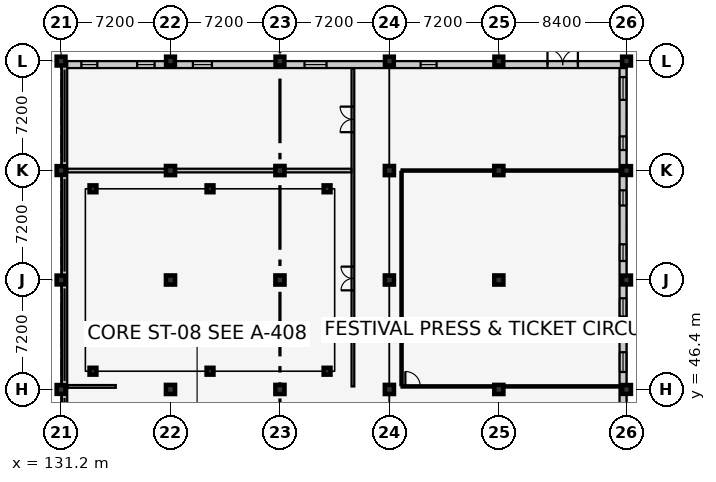
"""IFC4 building model, lengths in metres.
Left out: names, types, materials, properties, quantities, classifications, styles, units other than length and angle.
Written with IfcOpenShell. Run it as: python <this file> out.ifc"""

import sys

from ifc_helpers import new_model, si_unit, direction, frame, frame_2d, origin, origin_2d, place, context, subcontext, project, spatial, rectangle, extrude, element, fill, save


model = new_model("IFC4")
c1 = context("Model", 3, precision=1e-05, world=origin(), true_north=direction((0.0, 1.0)))
c2 = subcontext(c1, "Body", "Model", "MODEL_VIEW")
j1 = project(units=[si_unit("LENGTHUNIT", "METRE"), si_unit("PLANEANGLEUNIT", "RADIAN")], contexts=[c1])
p1 = place(None, origin())
s1 = spatial("IfcSite", under=j1, at=p1, CompositionType="ELEMENT")
p2 = place(p1, origin())
s2 = spatial("IfcBuilding", under=s1, at=p2, CompositionType="ELEMENT")
p3 = place(p2, origin())
s3 = spatial("IfcBuildingStorey", under=s2, at=p3, CompositionType="ELEMENT", Elevation=0.0)
for number, where, z_axis, x_axis in (
    (1, (131.2, 46.4, 0.0), (0.0, 0.0, 1.0), (1.0, 0.0, 0.0)),
    (2, (131.2, 53.6, 0.0), (0.0, 0.0, 1.0), (1.0, 0.0, 0.0)),
    (3, (131.2, 60.8, 0.0), (0.0, 0.0, 1.0), (1.0, 0.0, 0.0)),
    (4, (131.2, 68.0, 0.0), (0.0, 0.0, 1.0), (1.0, 0.0, 0.0)),
):
    element("IfcColumn", number, at=place(p3, frame(where, z_axis=z_axis, x_axis=x_axis)), inside=s3, PredefinedType="COLUMN", context=c2, shape_type="SweptSolid", body=[
        extrude(rectangle(XDim=0.58, YDim=0.58, at=origin_2d()), origin(), (0.0, 0.0, 1.0), 5.4),
    ])
for number, where, z_axis, x_axis in (
    (5, (138.4, 46.4, 0.0), (0.0, 0.0, 1.0), (1.0, 0.0, 0.0)),
    (6, (138.4, 53.6, 0.0), (0.0, 0.0, 1.0), (1.0, 0.0, 0.0)),
    (7, (138.4, 60.8, 0.0), (0.0, 0.0, 1.0), (1.0, 0.0, 0.0)),
):
    element("IfcColumn", number, at=place(p3, frame(where, z_axis=z_axis, x_axis=x_axis)), inside=s3, PredefinedType="COLUMN", context=c2, shape_type="SweptSolid", body=[
        extrude(rectangle(XDim=0.6, YDim=0.6, at=origin_2d()), origin(), (0.0, 0.0, 1.0), 5.4),
    ])
p4 = place(p3, frame((138.4, 68.0, 0.0), z_axis=(0.0, 0.0, 1.0), x_axis=(1.0, 0.0, 0.0)))
e8 = element("IfcColumn", 8, at=p4, inside=s3, PredefinedType="COLUMN", context=c2, shape_type="SweptSolid", body=[
    extrude(rectangle(XDim=0.58, YDim=0.58, at=origin_2d()), origin(), (0.0, 0.0, 1.0), 5.4),
])
for number, where, z_axis, x_axis in (
    (9, (145.6, 46.4, 0.0), (0.0, 0.0, 1.0), (1.0, 0.0, 0.0)),
    (10, (145.6, 53.6, 0.0), (0.0, 0.0, 1.0), (1.0, 0.0, 0.0)),
    (11, (145.6, 60.8, 0.0), (0.0, 0.0, 1.0), (1.0, 0.0, 0.0)),
):
    element("IfcColumn", number, at=place(p3, frame(where, z_axis=z_axis, x_axis=x_axis)), inside=s3, PredefinedType="COLUMN", context=c2, shape_type="SweptSolid", body=[
        extrude(rectangle(XDim=0.6, YDim=0.6, at=origin_2d()), origin(), (0.0, 0.0, 1.0), 5.4),
    ])
p5 = place(p3, frame((145.6, 68.0, 0.0), z_axis=(0.0, 0.0, 1.0), x_axis=(1.0, 0.0, 0.0)))
e12 = element("IfcColumn", 12, at=p5, inside=s3, PredefinedType="COLUMN", context=c2, shape_type="SweptSolid", body=[
    extrude(rectangle(XDim=0.58, YDim=0.58, at=origin_2d()), origin(), (0.0, 0.0, 1.0), 5.4),
])
for number, where, z_axis, x_axis in (
    (13, (152.8, 46.4, 0.0), (0.0, 0.0, 1.0), (1.0, 0.0, 0.0)),
    (14, (152.8, 53.6, 0.0), (0.0, 0.0, 1.0), (1.0, 0.0, 0.0)),
    (15, (152.8, 60.8, 0.0), (0.0, 0.0, 1.0), (1.0, 0.0, 0.0)),
):
    element("IfcColumn", number, at=place(p3, frame(where, z_axis=z_axis, x_axis=x_axis)), inside=s3, PredefinedType="COLUMN", context=c2, shape_type="SweptSolid", body=[
        extrude(rectangle(XDim=0.6, YDim=0.6, at=origin_2d()), origin(), (0.0, 0.0, 1.0), 5.4),
    ])
p6 = place(p3, frame((152.8, 68.0, 0.0), z_axis=(0.0, 0.0, 1.0), x_axis=(1.0, 0.0, 0.0)))
e16 = element("IfcColumn", 16, at=p6, inside=s3, PredefinedType="COLUMN", context=c2, shape_type="SweptSolid", body=[
    extrude(rectangle(XDim=0.58, YDim=0.58, at=origin_2d()), origin(), (0.0, 0.0, 1.0), 5.4),
])
for number, where, z_axis, x_axis in (
    (17, (160.0, 46.4, 0.0), (0.0, 0.0, 1.0), (1.0, 0.0, 0.0)),
    (18, (160.0, 53.6, 0.0), (0.0, 0.0, 1.0), (1.0, 0.0, 0.0)),
    (19, (160.0, 60.8, 0.0), (0.0, 0.0, 1.0), (1.0, 0.0, 0.0)),
):
    element("IfcColumn", number, at=place(p3, frame(where, z_axis=z_axis, x_axis=x_axis)), inside=s3, PredefinedType="COLUMN", context=c2, shape_type="SweptSolid", body=[
        extrude(rectangle(XDim=0.6, YDim=0.6, at=origin_2d()), origin(), (0.0, 0.0, 1.0), 5.4),
    ])
for number, where, z_axis, x_axis in (
    (20, (160.0, 68.0, 0.0), (0.0, 0.0, 1.0), (1.0, 0.0, 0.0)),
    (21, (168.4, 46.4, 0.0), (0.0, 0.0, 1.0), (1.0, 0.0, 0.0)),
    (22, (168.4, 53.6, 0.0), (0.0, 0.0, 1.0), (1.0, 0.0, 0.0)),
    (23, (168.4, 60.8, 0.0), (0.0, 0.0, 1.0), (1.0, 0.0, 0.0)),
    (24, (168.4, 68.0, 0.0), (0.0, 0.0, 1.0), (1.0, 0.0, 0.0)),
):
    element("IfcColumn", number, at=place(p3, frame(where, z_axis=z_axis, x_axis=x_axis)), inside=s3, PredefinedType="COLUMN", context=c2, shape_type="SweptSolid", body=[
        extrude(rectangle(XDim=0.58, YDim=0.58, at=origin_2d()), origin(), (0.0, 0.0, 1.0), 5.4),
    ])
p7 = place(p3, frame((133.3, 47.6, -0.55), z_axis=(0.0, 0.0, 1.0), x_axis=(1.0, 0.0, 0.0)))
e25 = element("IfcColumn", 25, at=p7, inside=s3, PredefinedType="COLUMN", context=c2, shape_type="SweptSolid", body=[
    extrude(rectangle(XDim=0.45, YDim=0.45, at=origin_2d()), origin(), (0.0, 0.0, 1.0), 0.985),
])
p8 = place(p3, frame((133.3, 59.6, -0.55), z_axis=(0.0, 0.0, 1.0), x_axis=(1.0, 0.0, 0.0)))
e26 = element("IfcColumn", 26, at=p8, inside=s3, PredefinedType="COLUMN", context=c2, shape_type="SweptSolid", body=[
    extrude(rectangle(XDim=0.45, YDim=0.45, at=origin_2d()), origin(), (0.0, 0.0, 1.0), 3.455),
])
p9 = place(p3, frame((141.0, 47.6, -0.55), z_axis=(0.0, 0.0, 1.0), x_axis=(1.0, 0.0, 0.0)))
e27 = element("IfcColumn", 27, at=p9, inside=s3, PredefinedType="COLUMN", context=c2, shape_type="SweptSolid", body=[
    extrude(rectangle(XDim=0.45, YDim=0.45, at=origin_2d()), origin(), (0.0, 0.0, 1.0), 0.985),
])
p10 = place(p3, frame((141.0, 59.6, -0.55), z_axis=(0.0, 0.0, 1.0), x_axis=(1.0, 0.0, 0.0)))
e28 = element("IfcColumn", 28, at=p10, inside=s3, PredefinedType="COLUMN", context=c2, shape_type="SweptSolid", body=[
    extrude(rectangle(XDim=0.45, YDim=0.45, at=origin_2d()), origin(), (0.0, 0.0, 1.0), 3.455),
])
p11 = place(p3, frame((148.7, 47.6, -0.55), z_axis=(0.0, 0.0, 1.0), x_axis=(1.0, 0.0, 0.0)))
e29 = element("IfcColumn", 29, at=p11, inside=s3, PredefinedType="COLUMN", context=c2, shape_type="SweptSolid", body=[
    extrude(rectangle(XDim=0.45, YDim=0.45, at=origin_2d()), origin(), (0.0, 0.0, 1.0), 0.985),
])
p12 = place(p3, frame((148.7, 59.6, -0.55), z_axis=(0.0, 0.0, 1.0), x_axis=(1.0, 0.0, 0.0)))
e30 = element("IfcColumn", 30, at=p12, inside=s3, PredefinedType="COLUMN", context=c2, shape_type="SweptSolid", body=[
    extrude(rectangle(XDim=0.45, YDim=0.45, at=origin_2d()), origin(), (0.0, 0.0, 1.0), 3.455),
])
p13 = place(p3, frame((168.17, 68.0, 0.0), z_axis=(0.0, 0.0, 1.0), x_axis=(0.0, -1.0, 0.0)))
e31 = element("IfcWall", 31, at=p13, inside=s3, PredefinedType="SOLIDWALL", context=c2, shape_type="SweptSolid", body=[
    extrude(rectangle(XDim=28.8, YDim=0.46, at=frame_2d((14.4, 0.0))), origin(), (0.0, 0.0, 1.0), 4.555),
])
p14 = place(p13, frame((1.05, 0.0, 0.9)))
e32 = element("IfcOpeningElement", 32, at=p14, cuts=e31, PredefinedType="OPENING", context=c2, shape_type="SweptSolid", body=[
    extrude(rectangle(XDim=1.5, YDim=1.75, at=frame_2d((0.75, 0.875))), frame((0.0, 0.242, 0.0), z_axis=(0.0, -1.0, 0.0), x_axis=(1.0, 0.0, 0.0)), (0.0, 0.0, 1.0), 0.484),
])
p15 = place(p13, frame((4.95, 0.0, 0.9)))
e33 = element("IfcOpeningElement", 33, at=p15, cuts=e31, PredefinedType="OPENING", context=c2, shape_type="SweptSolid", body=[
    extrude(rectangle(XDim=0.9, YDim=1.35, at=frame_2d((0.45, 0.675))), frame((0.0, 0.242, 0.0), z_axis=(0.0, -1.0, 0.0), x_axis=(1.0, 0.0, 0.0)), (0.0, 0.0, 1.0), 0.484),
])
p16 = place(p13, frame((8.5, 0.0, 0.9)))
e34 = element("IfcOpeningElement", 34, at=p16, cuts=e31, PredefinedType="OPENING", context=c2, shape_type="SweptSolid", body=[
    extrude(rectangle(XDim=1.0, YDim=1.35, at=frame_2d((0.5, 0.675))), frame((0.0, 0.242, 0.0), z_axis=(0.0, -1.0, 0.0), x_axis=(1.0, 0.0, 0.0)), (0.0, 0.0, 1.0), 0.484),
])
p17 = place(p13, frame((12.05, 0.0, 0.9)))
e35 = element("IfcOpeningElement", 35, at=p17, cuts=e31, PredefinedType="OPENING", context=c2, shape_type="SweptSolid", body=[
    extrude(rectangle(XDim=1.1, YDim=1.35, at=frame_2d((0.55, 0.675))), frame((0.0, 0.242, 0.0), z_axis=(0.0, -1.0, 0.0), x_axis=(1.0, 0.0, 0.0)), (0.0, 0.0, 1.0), 0.484),
])
p18 = place(p13, frame((15.6, 0.0, 0.9)))
e36 = element("IfcOpeningElement", 36, at=p18, cuts=e31, PredefinedType="OPENING", context=c2, shape_type="SweptSolid", body=[
    extrude(rectangle(XDim=1.2, YDim=1.35, at=frame_2d((0.6, 0.675))), frame((0.0, 0.242, 0.0), z_axis=(0.0, -1.0, 0.0), x_axis=(1.0, 0.0, 0.0)), (0.0, 0.0, 1.0), 0.484),
])
p19 = place(p13, frame((19.15, 0.0, 0.9)))
e37 = element("IfcOpeningElement", 37, at=p19, cuts=e31, PredefinedType="OPENING", context=c2, shape_type="SweptSolid", body=[
    extrude(rectangle(XDim=1.3, YDim=1.35, at=frame_2d((0.65, 0.675))), frame((0.0, 0.242, 0.0), z_axis=(0.0, -1.0, 0.0), x_axis=(1.0, 0.0, 0.0)), (0.0, 0.0, 1.0), 0.484),
])
p20 = place(p13, frame((26.525, 0.0, 0.9)))
e38 = element("IfcOpeningElement", 38, at=p20, cuts=e31, PredefinedType="OPENING", context=c2, shape_type="SweptSolid", body=[
    extrude(rectangle(XDim=0.95, YDim=1.45, at=frame_2d((0.475, 0.725))), frame((0.0, 0.242, 0.0), z_axis=(0.0, -1.0, 0.0), x_axis=(1.0, 0.0, 0.0)), (0.0, 0.0, 1.0), 0.484),
])
p21 = place(p3, frame((131.2, 67.77, 0.0), z_axis=(0.0, 0.0, 1.0), x_axis=(1.0, 0.0, 0.0)))
e39 = element("IfcWall", 39, at=p21, inside=s3, PredefinedType="SOLIDWALL", context=c2, shape_type="SweptSolid", body=[
    extrude(rectangle(XDim=37.2, YDim=0.46, at=frame_2d((18.6, 0.0))), origin(), (0.0, 0.0, 1.0), 4.315),
])
p22 = place(p21, frame((32.0, 0.0, 0.0)))
e40 = element("IfcOpeningElement", 40, at=p22, cuts=e39, PredefinedType="OPENING", context=c2, shape_type="SweptSolid", body=[
    extrude(rectangle(XDim=2.0, YDim=2.35, at=frame_2d((1.0, 1.175))), frame((0.0, 0.242, 0.0), z_axis=(0.0, -1.0, 0.0), x_axis=(1.0, 0.0, 0.0)), (0.0, 0.0, 1.0), 0.484),
])
p23 = place(p21, frame((1.335, 0.0, 0.9)))
e41 = element("IfcOpeningElement", 41, at=p23, cuts=e39, PredefinedType="OPENING", context=c2, shape_type="SweptSolid", body=[
    extrude(rectangle(XDim=1.05, YDim=1.45, at=frame_2d((0.525, 0.725))), frame((0.0, 0.242, 0.0), z_axis=(0.0, -1.0, 0.0), x_axis=(1.0, 0.0, 0.0)), (0.0, 0.0, 1.0), 0.484),
])
p24 = place(p21, frame((5.005, 0.0, 0.9)))
e42 = element("IfcOpeningElement", 42, at=p24, cuts=e39, PredefinedType="OPENING", context=c2, shape_type="SweptSolid", body=[
    extrude(rectangle(XDim=1.15, YDim=1.45, at=frame_2d((0.575, 0.725))), frame((0.0, 0.242, 0.0), z_axis=(0.0, -1.0, 0.0), x_axis=(1.0, 0.0, 0.0)), (0.0, 0.0, 1.0), 0.484),
])
p25 = place(p21, frame((8.675, 0.0, 0.9)))
e43 = element("IfcOpeningElement", 43, at=p25, cuts=e39, PredefinedType="OPENING", context=c2, shape_type="SweptSolid", body=[
    extrude(rectangle(XDim=1.25, YDim=1.45, at=frame_2d((0.625, 0.725))), frame((0.0, 0.242, 0.0), z_axis=(0.0, -1.0, 0.0), x_axis=(1.0, 0.0, 0.0)), (0.0, 0.0, 1.0), 0.484),
])
p26 = place(p21, frame((16.015, 0.0, 0.9)))
e44 = element("IfcOpeningElement", 44, at=p26, cuts=e39, PredefinedType="OPENING", context=c2, shape_type="SweptSolid", body=[
    extrude(rectangle(XDim=1.45, YDim=1.45, at=frame_2d((0.725, 0.725))), frame((0.0, 0.242, 0.0), z_axis=(0.0, -1.0, 0.0), x_axis=(1.0, 0.0, 0.0)), (0.0, 0.0, 1.0), 0.484),
])
p27 = place(p21, frame((23.655, 0.0, 0.9)))
e45 = element("IfcOpeningElement", 45, at=p27, cuts=e39, PredefinedType="OPENING", context=c2, shape_type="SweptSolid", body=[
    extrude(rectangle(XDim=1.05, YDim=1.6, at=frame_2d((0.525, 0.8))), frame((0.0, 0.242, 0.0), z_axis=(0.0, -1.0, 0.0), x_axis=(1.0, 0.0, 0.0)), (0.0, 0.0, 1.0), 0.484),
])
p28 = place(p3, frame((131.43, 39.2, 0.0), z_axis=(0.0, 0.0, 1.0), x_axis=(0.0, 1.0, 0.0)))
e46 = element("IfcWall", 46, at=p28, inside=s3, PredefinedType="SOLIDWALL", context=c2, shape_type="SweptSolid", body=[
    extrude(rectangle(XDim=28.8, YDim=0.35, at=frame_2d((14.4, 0.0))), origin(), (0.0, 0.0, 1.0), 0.85),
])
p29 = place(p3, frame((131.615, 46.6, 0.0), z_axis=(0.0, 0.0, 1.0), x_axis=(1.0, 0.0, 0.0)))
e47 = element("IfcWall", 47, at=p29, inside=s3, PredefinedType="PARTITIONING", context=c2, shape_type="SweptSolid", body=[
    extrude(rectangle(XDim=3.185, YDim=0.18, at=frame_2d((1.593, 0.0))), origin(), (0.0, 0.0, 1.0), 4.285),
])
p30 = place(p3, frame((150.4, 46.6, 0.0), z_axis=(0.0, 0.0, 1.0), x_axis=(0.0, 1.0, 0.0)))
e48 = element("IfcWall", 48, at=p30, inside=s3, PredefinedType="PARTITIONING", context=c2, shape_type="SweptSolid", body=[
    extrude(rectangle(XDim=20.93, YDim=0.18, at=frame_2d((10.465, 0.0))), origin(), (0.0, 0.0, 1.0), 5.16),
])
p31 = place(p30, frame((6.32, 0.0, 0.0)))
e49 = element("IfcOpeningElement", 49, at=p31, cuts=e48, PredefinedType="OPENING", context=c2, shape_type="SweptSolid", body=[
    extrude(rectangle(XDim=1.56, YDim=2.25, at=frame_2d((0.78, 1.125))), frame((0.0, 0.102, 0.0), z_axis=(0.0, -1.0, 0.0), x_axis=(1.0, 0.0, 0.0)), (0.0, 0.0, 1.0), 0.204),
])
p32 = place(p30, frame((16.725, 0.0, 0.0)))
e50 = element("IfcOpeningElement", 50, at=p32, cuts=e48, PredefinedType="OPENING", context=c2, shape_type="SweptSolid", body=[
    extrude(rectangle(XDim=1.68, YDim=2.3, at=frame_2d((0.84, 1.15))), frame((0.0, 0.102, 0.0), z_axis=(0.0, -1.0, 0.0), x_axis=(1.0, 0.0, 0.0)), (0.0, 0.0, 1.0), 0.204),
])
p33 = place(p3, frame((131.615, 60.8, 0.0), z_axis=(0.0, 0.0, 1.0), x_axis=(1.0, 0.0, 0.0)))
e51 = element("IfcWall", 51, at=p33, inside=s3, PredefinedType="PARTITIONING", context=c2, shape_type="SweptSolid", body=[
    extrude(rectangle(XDim=18.685, YDim=0.24, at=frame_2d((9.343, 0.0))), origin(), (0.0, 0.0, 1.0), 4.285),
])
p34 = place(p3, frame((153.6, 46.6, 0.0), z_axis=(0.0, 0.0, 1.0), x_axis=(1.0, 0.0, 0.0)))
e52 = element("IfcWall", 52, at=p34, inside=s3, PredefinedType="PARTITIONING", context=c2, shape_type="SweptSolid", body=[
    extrude(rectangle(XDim=14.33, YDim=0.15, at=frame_2d((7.165, 0.0))), origin(), (0.0, 0.0, 1.0), 4.185),
])
p35 = place(p34, frame((0.25, 0.0, 0.0)))
e53 = element("IfcOpeningElement", 53, at=p35, cuts=e52, PredefinedType="OPENING", context=c2, shape_type="SweptSolid", body=[
    extrude(rectangle(XDim=0.98, YDim=2.12, at=frame_2d((0.49, 1.06))), frame((0.0, 0.087, 0.0), z_axis=(0.0, -1.0, 0.0), x_axis=(1.0, 0.0, 0.0)), (0.0, 0.0, 1.0), 0.174),
])
p36 = place(p3, frame((153.6, 60.8, 0.0), z_axis=(0.0, 0.0, 1.0), x_axis=(1.0, 0.0, 0.0)))
e54 = element("IfcWall", 54, at=p36, inside=s3, PredefinedType="PARTITIONING", context=c2, shape_type="SweptSolid", body=[
    extrude(rectangle(XDim=14.33, YDim=0.15, at=frame_2d((7.165, 0.0))), origin(), (0.0, 0.0, 1.0), 4.185),
])
p37 = place(p3, frame((153.6, 46.685, 0.0), z_axis=(0.0, 0.0, 1.0), x_axis=(0.0, 1.0, 0.0)))
e55 = element("IfcWall", 55, at=p37, inside=s3, PredefinedType="PARTITIONING", context=c2, shape_type="SweptSolid", body=[
    extrude(rectangle(XDim=14.03, YDim=0.15, at=frame_2d((7.015, 0.0))), origin(), (0.0, 0.0, 1.0), 5.16),
])
p38 = place(p14, origin())
e56 = element("IfcWindow", 56, at=p38, inside=s3, PartitioningType="SINGLE_PANEL", PredefinedType="WINDOW", context=c2, shape_type="SweptSolid", body=[
    extrude(rectangle(XDim=1.5, YDim=1.75, at=frame_2d((0.75, 0.875))), frame((0.0, 0.03, 0.0), z_axis=(0.0, -1.0, 0.0), x_axis=(1.0, 0.0, 0.0)), (0.0, 0.0, 1.0), 0.06),
])
fill(e32, e56)
p39 = place(p15, origin())
e57 = element("IfcWindow", 57, at=p39, inside=s3, PartitioningType="SINGLE_PANEL", PredefinedType="WINDOW", context=c2, shape_type="SweptSolid", body=[
    extrude(rectangle(XDim=0.9, YDim=1.35, at=frame_2d((0.45, 0.675))), frame((0.0, 0.03, 0.0), z_axis=(0.0, -1.0, 0.0), x_axis=(1.0, 0.0, 0.0)), (0.0, 0.0, 1.0), 0.06),
])
fill(e33, e57)
p40 = place(p16, origin())
e58 = element("IfcWindow", 58, at=p40, inside=s3, PartitioningType="SINGLE_PANEL", PredefinedType="WINDOW", context=c2, shape_type="SweptSolid", body=[
    extrude(rectangle(XDim=1.0, YDim=1.35, at=frame_2d((0.5, 0.675))), frame((0.0, 0.03, 0.0), z_axis=(0.0, -1.0, 0.0), x_axis=(1.0, 0.0, 0.0)), (0.0, 0.0, 1.0), 0.06),
])
fill(e34, e58)
p41 = place(p17, origin())
e59 = element("IfcWindow", 59, at=p41, inside=s3, PartitioningType="SINGLE_PANEL", PredefinedType="WINDOW", context=c2, shape_type="SweptSolid", body=[
    extrude(rectangle(XDim=1.1, YDim=1.35, at=frame_2d((0.55, 0.675))), frame((0.0, 0.03, 0.0), z_axis=(0.0, -1.0, 0.0), x_axis=(1.0, 0.0, 0.0)), (0.0, 0.0, 1.0), 0.06),
])
fill(e35, e59)
p42 = place(p18, origin())
e60 = element("IfcWindow", 60, at=p42, inside=s3, PartitioningType="SINGLE_PANEL", PredefinedType="WINDOW", context=c2, shape_type="SweptSolid", body=[
    extrude(rectangle(XDim=1.2, YDim=1.35, at=frame_2d((0.6, 0.675))), frame((0.0, 0.03, 0.0), z_axis=(0.0, -1.0, 0.0), x_axis=(1.0, 0.0, 0.0)), (0.0, 0.0, 1.0), 0.06),
])
fill(e36, e60)
p43 = place(p19, origin())
e61 = element("IfcWindow", 61, at=p43, inside=s3, PartitioningType="SINGLE_PANEL", PredefinedType="WINDOW", context=c2, shape_type="SweptSolid", body=[
    extrude(rectangle(XDim=1.3, YDim=1.35, at=frame_2d((0.65, 0.675))), frame((0.0, 0.03, 0.0), z_axis=(0.0, -1.0, 0.0), x_axis=(1.0, 0.0, 0.0)), (0.0, 0.0, 1.0), 0.06),
])
fill(e37, e61)
p44 = place(p22, origin())
e62 = element("IfcDoor", 62, at=p44, inside=s3, OperationType="DOUBLE_DOOR_SINGLE_SWING", PredefinedType="DOOR", context=c2, shape_type="SweptSolid", body=[
    extrude(rectangle(XDim=2.0, YDim=2.35, at=frame_2d((1.0, 1.175))), frame((0.0, 0.025, 0.0), z_axis=(0.0, -1.0, 0.0), x_axis=(1.0, 0.0, 0.0)), (0.0, 0.0, 1.0), 0.05),
])
fill(e40, e62)
p45 = place(p23, origin())
e63 = element("IfcWindow", 63, at=p45, inside=s3, PartitioningType="SINGLE_PANEL", PredefinedType="WINDOW", context=c2, shape_type="SweptSolid", body=[
    extrude(rectangle(XDim=1.05, YDim=1.45, at=frame_2d((0.525, 0.725))), frame((0.0, 0.03, 0.0), z_axis=(0.0, -1.0, 0.0), x_axis=(1.0, 0.0, 0.0)), (0.0, 0.0, 1.0), 0.06),
])
fill(e41, e63)
p46 = place(p24, origin())
e64 = element("IfcWindow", 64, at=p46, inside=s3, PartitioningType="SINGLE_PANEL", PredefinedType="WINDOW", context=c2, shape_type="SweptSolid", body=[
    extrude(rectangle(XDim=1.15, YDim=1.45, at=frame_2d((0.575, 0.725))), frame((0.0, 0.03, 0.0), z_axis=(0.0, -1.0, 0.0), x_axis=(1.0, 0.0, 0.0)), (0.0, 0.0, 1.0), 0.06),
])
fill(e42, e64)
p47 = place(p25, origin())
e65 = element("IfcWindow", 65, at=p47, inside=s3, PartitioningType="SINGLE_PANEL", PredefinedType="WINDOW", context=c2, shape_type="SweptSolid", body=[
    extrude(rectangle(XDim=1.25, YDim=1.45, at=frame_2d((0.625, 0.725))), frame((0.0, 0.03, 0.0), z_axis=(0.0, -1.0, 0.0), x_axis=(1.0, 0.0, 0.0)), (0.0, 0.0, 1.0), 0.06),
])
fill(e43, e65)
p48 = place(p26, origin())
e66 = element("IfcWindow", 66, at=p48, inside=s3, PartitioningType="SINGLE_PANEL", PredefinedType="WINDOW", context=c2, shape_type="SweptSolid", body=[
    extrude(rectangle(XDim=1.45, YDim=1.45, at=frame_2d((0.725, 0.725))), frame((0.0, 0.03, 0.0), z_axis=(0.0, -1.0, 0.0), x_axis=(1.0, 0.0, 0.0)), (0.0, 0.0, 1.0), 0.06),
])
fill(e44, e66)
p49 = place(p27, origin())
e67 = element("IfcWindow", 67, at=p49, inside=s3, PartitioningType="SINGLE_PANEL", PredefinedType="WINDOW", context=c2, shape_type="SweptSolid", body=[
    extrude(rectangle(XDim=1.05, YDim=1.6, at=frame_2d((0.525, 0.8))), frame((0.0, 0.03, 0.0), z_axis=(0.0, -1.0, 0.0), x_axis=(1.0, 0.0, 0.0)), (0.0, 0.0, 1.0), 0.06),
])
fill(e45, e67)
p50 = place(p31, origin())
e68 = element("IfcDoor", 68, at=p50, inside=s3, OperationType="DOUBLE_DOOR_SINGLE_SWING", PredefinedType="DOOR", context=c2, shape_type="SweptSolid", body=[
    extrude(rectangle(XDim=1.56, YDim=2.25, at=frame_2d((0.78, 1.125))), frame((0.0, 0.025, 0.0), z_axis=(0.0, -1.0, 0.0), x_axis=(1.0, 0.0, 0.0)), (0.0, 0.0, 1.0), 0.05),
])
fill(e49, e68)
p51 = place(p35, origin())
e69 = element("IfcDoor", 69, at=p51, inside=s3, OperationType="SINGLE_SWING_LEFT", PredefinedType="DOOR", context=c2, shape_type="SweptSolid", body=[
    extrude(rectangle(XDim=0.98, YDim=2.12, at=frame_2d((0.49, 1.06))), frame((0.0, 0.025, 0.0), z_axis=(0.0, -1.0, 0.0), x_axis=(1.0, 0.0, 0.0)), (0.0, 0.0, 1.0), 0.05),
])
fill(e53, e69)
p52 = place(p32, origin())
e70 = element("IfcDoor", 70, at=p52, inside=s3, OperationType="DOUBLE_DOOR_SINGLE_SWING", PredefinedType="DOOR", context=c2, shape_type="SweptSolid", body=[
    extrude(rectangle(XDim=1.68, YDim=2.3, at=frame_2d((0.84, 1.15))), frame((0.0, 0.025, 0.0), z_axis=(0.0, -1.0, 0.0), x_axis=(1.0, 0.0, 0.0)), (0.0, 0.0, 1.0), 0.05),
])
fill(e50, e70)
save(model, sys.argv[1])
